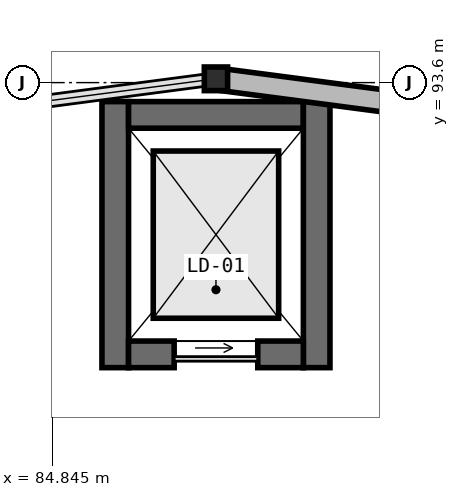
"""IFC4 building model, lengths in metres.
Left out: names, types, materials, properties, quantities, classifications, styles, units other than length and angle.
Written with IfcOpenShell. Run it as: python <this file> out.ifc"""

import sys

from ifc_helpers import new_model, si_unit, direction, frame, frame_2d, origin, origin_2d, place, context, subcontext, project, spatial, rectangle, i_section, extrude, element, fill, save


model = new_model("IFC4")
c1 = context("Model", 3, precision=1e-05, world=origin(), true_north=direction((0.0, 1.0)))
c2 = subcontext(c1, "Body", "Model", "MODEL_VIEW")
j1 = project(units=[si_unit("LENGTHUNIT", "METRE"), si_unit("PLANEANGLEUNIT", "RADIAN")], contexts=[c1])
p1 = place(None, origin())
s1 = spatial("IfcSite", under=j1, at=p1, CompositionType="ELEMENT")
p2 = place(p1, origin())
s2 = spatial("IfcBuilding", under=s1, at=p2, CompositionType="ELEMENT")
p3 = place(p2, frame((0.0, 0.0, 14.35)))
s3 = spatial("IfcBuildingStorey", under=s2, at=p3, CompositionType="ELEMENT", Elevation=14.35)
p4 = place(p3, frame((85.675, 89.85, 0.0), z_axis=(0.0, 0.0, 1.0), x_axis=(0.0, 1.0, 0.0)))
e1 = element("IfcWall", 1, at=p4, inside=s3, PredefinedType="SHEAR", context=c2, shape_type="SweptSolid", body=[
    extrude(rectangle(XDim=3.5, YDim=0.35, at=frame_2d((1.75, 0.0))), origin(), (0.0, 0.0, 1.0), 4.55),
])
p5 = place(p3, frame((85.85, 93.175, 0.0), z_axis=(0.0, 0.0, 1.0), x_axis=(1.0, 0.0, 0.0)))
e2 = element("IfcWall", 2, at=p5, inside=s3, PredefinedType="SHEAR", context=c2, shape_type="SweptSolid", body=[
    extrude(rectangle(XDim=2.3, YDim=0.35, at=frame_2d((1.15, 0.0))), origin(), (0.0, 0.0, 1.0), 4.55),
])
p6 = place(p3, frame((88.325, 93.35, 0.0), z_axis=(0.0, 0.0, 1.0), x_axis=(0.0, -1.0, 0.0)))
e3 = element("IfcWall", 3, at=p6, inside=s3, PredefinedType="SHEAR", context=c2, shape_type="SweptSolid", body=[
    extrude(rectangle(XDim=3.5, YDim=0.35, at=frame_2d((1.75, 0.0))), origin(), (0.0, 0.0, 1.0), 4.55),
])
p7 = place(p3, frame((88.15, 90.025, 0.0), z_axis=(0.0, 0.0, 1.0), x_axis=(-1.0, 0.0, 0.0)))
e4 = element("IfcWall", 4, at=p7, inside=s3, PredefinedType="SHEAR", context=c2, shape_type="SweptSolid", body=[
    extrude(rectangle(XDim=2.3, YDim=0.35, at=frame_2d((1.15, 0.0))), origin(), (0.0, 0.0, 1.0), 4.55),
])
p8 = place(p7, frame((0.6, 0.0, 0.0)))
e5 = element("IfcOpeningElement", 5, at=p8, cuts=e4, PredefinedType="OPENING", context=c2, shape_type="SweptSolid", body=[
    extrude(rectangle(XDim=1.1, YDim=2.15, at=frame_2d((0.55, 1.075))), frame((0.0, 0.185, 0.0), z_axis=(0.0, -1.0, 0.0), x_axis=(1.0, 0.0, 0.0)), (0.0, 0.0, 1.0), 0.37),
])
p9 = place(p3, frame((87.0, 93.65, 0.0), z_axis=(0.0, 0.0, 1.0), x_axis=(1.0, 0.0, 0.0)))
e6 = element("IfcColumn", 6, at=p9, inside=s3, PredefinedType="COLUMN", context=c2, shape_type="SweptSolid", body=[
    extrude(i_section(OverallWidth=0.306, OverallDepth=0.311, WebThickness=0.011, FlangeThickness=0.017, at=origin_2d()), origin(), (0.0, 0.0, 1.0), 4.55),
])
p10 = place(p3, frame((97.0, 93.344, 0.0), z_axis=(0.0, 0.0, 1.0), x_axis=(-0.991454872597, 0.130450126879, 0.0)))
e7 = element("IfcWall", 7, at=p10, inside=s3, PredefinedType="SOLIDWALL", context=c2, shape_type="SweptSolid", body=[
    extrude(rectangle(XDim=10.08, YDim=0.29, at=frame_2d((5.04, 0.0))), origin(), (0.0, 0.0, 1.0), 3.734),
])
p11 = place(p10, frame((3.69, 0.0, 0.95)))
e8 = element("IfcOpeningElement", 8, at=p11, cuts=e7, PredefinedType="OPENING", context=c2, shape_type="SweptSolid", body=[
    extrude(rectangle(XDim=2.7, YDim=1.51, at=frame_2d((1.35, 0.755))), frame((0.0, 0.155, 0.0), z_axis=(0.0, -1.0, 0.0), x_axis=(1.0, 0.0, 0.0)), (0.0, 0.0, 1.0), 0.31),
])
p12 = place(p3, frame((86.994, 94.659, 0.0), z_axis=(0.0, 0.0, 1.0), x_axis=(-0.991454872597, -0.130450126879, 0.0)))
e9 = element("IfcWall", 9, at=p12, inside=s3, PredefinedType="SOLIDWALL", context=c2, shape_type="SweptSolid", body=[
    extrude(rectangle(XDim=10.08, YDim=0.29, at=frame_2d((5.04, 0.0))), origin(), (0.0, 0.0, 1.0), 3.734),
])
p13 = place(p12, frame((4.405, 0.0, 0.95)))
e10 = element("IfcOpeningElement", 10, at=p13, cuts=e9, PredefinedType="OPENING", context=c2, shape_type="SweptSolid", body=[
    extrude(rectangle(XDim=1.27, YDim=1.43, at=frame_2d((0.635, 0.715))), frame((0.0, 0.155, 0.0), z_axis=(0.0, -1.0, 0.0), x_axis=(1.0, 0.0, 0.0)), (0.0, 0.0, 1.0), 0.31),
])
p14 = place(p3, frame((87.004, 93.649, 0.0), z_axis=(0.0, 0.0, 1.0), x_axis=(0.991456749128, -0.130435863969, 0.0)))
e11 = element("IfcWall", 11, at=p14, inside=s3, PredefinedType="SOLIDWALL", context=c2, shape_type="SweptSolid", body=[
    extrude(rectangle(XDim=9.821, YDim=0.29, at=frame_2d((4.911, 0.0))), origin(), (0.0, 0.0, 1.0), 3.816),
])
p15 = place(p14, frame((6.181, 0.0, 0.95)))
e12 = element("IfcOpeningElement", 12, at=p15, cuts=e11, PredefinedType="OPENING", context=c2, shape_type="SweptSolid", body=[
    extrude(rectangle(XDim=2.37, YDim=1.64, at=frame_2d((1.185, 0.82))), frame((0.0, 0.155, 0.0), z_axis=(0.0, -1.0, 0.0), x_axis=(1.0, 0.0, 0.0)), (0.0, 0.0, 1.0), 0.31),
])
p16 = place(p8, origin())
e13 = element("IfcDoor", 13, at=p16, inside=s3, OperationType="SLIDING_TO_LEFT", PredefinedType="USERDEFINED", context=c2, shape_type="SweptSolid", body=[
    extrude(rectangle(XDim=1.1, YDim=2.15, at=frame_2d((0.55, 1.075))), frame((0.0, 0.025, 0.0), z_axis=(0.0, -1.0, 0.0), x_axis=(1.0, 0.0, 0.0)), (0.0, 0.0, 1.0), 0.05),
])
fill(e5, e13)
save(model, sys.argv[1])
